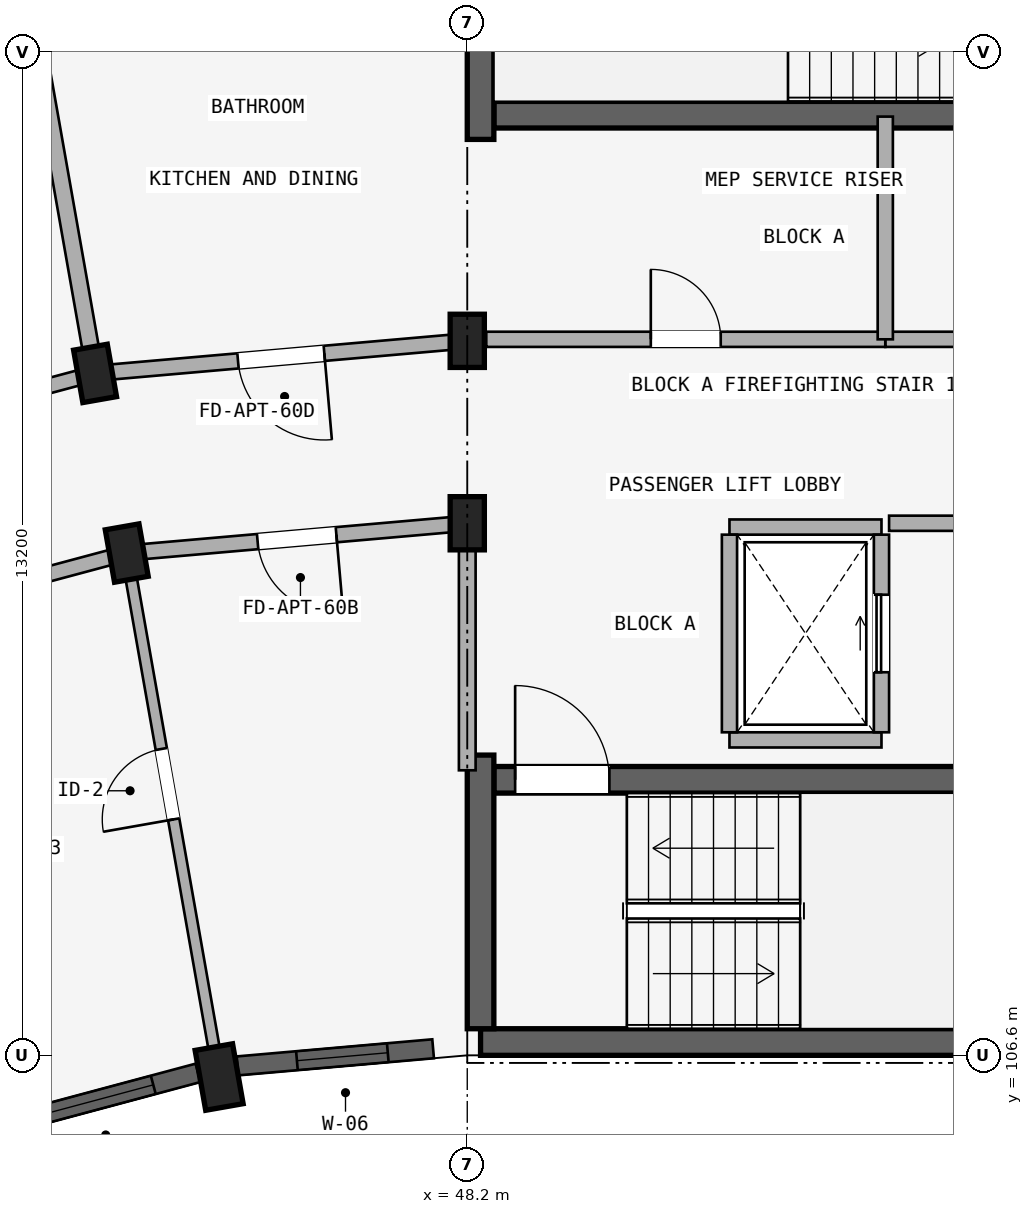
"""IFC4 building model, lengths in metres.
Left out: names, types, materials, properties, quantities, classifications, styles, units other than length and angle.
Written with IfcOpenShell. Run it as: python <this file> out.ifc"""

import sys

from ifc_helpers import new_model, si_unit, direction, frame, frame_2d, origin, origin_2d, place, context, subcontext, project, spatial, rectangle, extrude, element, fill, save


model = new_model("IFC4")
c1 = context("Model", 3, precision=1e-05, world=origin(), true_north=direction((0.0, 1.0)))
c2 = subcontext(c1, "Body", "Model", "MODEL_VIEW")
j1 = project(units=[si_unit("LENGTHUNIT", "METRE"), si_unit("PLANEANGLEUNIT", "RADIAN")], contexts=[c1])
p1 = place(None, origin())
s1 = spatial("IfcSite", under=j1, at=p1, CompositionType="ELEMENT")
p2 = place(p1, origin())
s2 = spatial("IfcBuilding", under=s1, at=p2, CompositionType="ELEMENT")
p3 = place(p2, frame((0.0, 0.0, 18.15)))
s3 = spatial("IfcBuildingStorey", under=s2, at=p3, CompositionType="ELEMENT", Elevation=18.15)
p4 = place(p3, frame((48.55, 118.975, 0.0), z_axis=(0.0, 0.0, 1.0), x_axis=(1.0, 0.0, 0.0)))
e1 = element("IfcWall", 1, at=p4, inside=s3, PredefinedType="SHEAR", context=c2, shape_type="SweptSolid", body=[
    extrude(rectangle(XDim=8.075, YDim=0.35, at=frame_2d((4.038, 0.0))), origin(), (0.0, 0.0, 1.0), 2.93),
])
p5 = place(p4, frame((6.38, 0.0, 0.0)))
e2 = element("IfcOpeningElement", 2, at=p5, cuts=e1, PredefinedType="OPENING", context=c2, shape_type="SweptSolid", body=[
    extrude(rectangle(XDim=1.24, YDim=2.15, at=frame_2d((0.62, 1.075))), frame((0.0, 0.185, 0.0), z_axis=(0.0, -1.0, 0.0), x_axis=(1.0, 0.0, 0.0)), (0.0, 0.0, 1.0), 0.37),
])
p6 = place(p3, frame((48.375, 118.65, 0.0), z_axis=(0.0, 0.0, 1.0), x_axis=(0.0, 1.0, 0.0)))
e3 = element("IfcWall", 3, at=p6, inside=s3, PredefinedType="SHEAR", context=c2, shape_type="SweptSolid", body=[
    extrude(rectangle(XDim=3.6, YDim=0.35, at=frame_2d((1.8, 0.0))), origin(), (0.0, 0.0, 1.0), 2.93),
])
p7 = place(p3, frame((48.375, 106.775, 0.0), z_axis=(0.0, 0.0, 1.0), x_axis=(1.0, 0.0, 0.0)))
e4 = element("IfcWall", 4, at=p7, inside=s3, PredefinedType="SHEAR", context=c2, shape_type="SweptSolid", body=[
    extrude(rectangle(XDim=8.25, YDim=0.35, at=frame_2d((4.125, 0.0))), origin(), (0.0, 0.0, 1.0), 2.93),
])
p8 = place(p3, frame((48.55, 110.225, 0.0), z_axis=(0.0, 0.0, 1.0), x_axis=(1.0, 0.0, 0.0)))
e5 = element("IfcWall", 5, at=p8, inside=s3, PredefinedType="SHEAR", context=c2, shape_type="SweptSolid", body=[
    extrude(rectangle(XDim=7.9, YDim=0.35, at=frame_2d((3.95, 0.0))), origin(), (0.0, 0.0, 1.0), 2.93),
])
p9 = place(p8, frame((0.28, 0.0, 0.0)))
e6 = element("IfcOpeningElement", 6, at=p9, cuts=e5, PredefinedType="OPENING", context=c2, shape_type="SweptSolid", body=[
    extrude(rectangle(XDim=1.24, YDim=2.15, at=frame_2d((0.62, 1.075))), frame((0.0, 0.185, 0.0), z_axis=(0.0, -1.0, 0.0), x_axis=(1.0, 0.0, 0.0)), (0.0, 0.0, 1.0), 0.37),
])
p10 = place(p3, frame((48.375, 106.95, 0.0), z_axis=(0.0, 0.0, 1.0), x_axis=(0.0, 1.0, 0.0)))
e7 = element("IfcWall", 7, at=p10, inside=s3, PredefinedType="SHEAR", context=c2, shape_type="SweptSolid", body=[
    extrude(rectangle(XDim=3.6, YDim=0.35, at=frame_2d((1.8, 0.0))), origin(), (0.0, 0.0, 1.0), 2.93),
])
for number, where, z_axis, x_axis in (
    (8, (48.2, 113.6, 0.0), (0.0, 0.0, 1.0), (1.0, 0.0, 0.0)),
    (9, (48.2, 116.0, 0.0), (0.0, 0.0, 1.0), (1.0, 0.0, 0.0)),
):
    element("IfcColumn", number, at=place(p3, frame(where, z_axis=z_axis, x_axis=x_axis)), inside=s3, PredefinedType="COLUMN", context=c2, shape_type="SweptSolid", body=[
        extrude(rectangle(XDim=0.45, YDim=0.7, at=origin_2d()), origin(), (0.0, 0.0, 1.0), 2.93),
    ])
p11 = place(p3, frame((44.935, 106.314, 0.0), z_axis=(0.0, 0.0, 1.0), x_axis=(0.984807753012, 0.173648177667, 0.0)))
e10 = element("IfcColumn", 10, at=p11, inside=s3, PredefinedType="COLUMN", context=c2, shape_type="SweptSolid", body=[
    extrude(rectangle(XDim=0.5, YDim=0.8, at=origin_2d()), origin(), (0.0, 0.0, 1.0), 2.93),
])
for number, where, z_axis, x_axis in (
    (11, (43.72, 113.208, 0.0), (0.0, 0.0, 1.0), (0.985, 0.174, 0.0)),
    (12, (43.303, 115.572, 0.0), (0.0, 0.0, 1.0), (0.985, 0.174, 0.0)),
):
    element("IfcColumn", number, at=place(p3, frame(where, z_axis=z_axis, x_axis=x_axis)), inside=s3, PredefinedType="COLUMN", context=c2, shape_type="SweptSolid", body=[
        extrude(rectangle(XDim=0.45, YDim=0.7, at=origin_2d()), origin(), (0.0, 0.0, 1.0), 2.93),
    ])
p12 = place(p3, frame((53.7, 116.02, 0.0), z_axis=(0.0, 0.0, 1.0), x_axis=(1.0, 0.0, 0.0)))
e13 = element("IfcWall", 13, at=p12, inside=s3, PredefinedType="STANDARD", context=c2, shape_type="SweptSolid", body=[
    extrude(rectangle(XDim=5.65, YDim=0.2, at=frame_2d((2.825, 0.0))), origin(), (0.0, 0.0, 1.0), 2.372),
])
p13 = place(p12, frame((1.923, 0.0, 0.0)))
e14 = element("IfcOpeningElement", 14, at=p13, cuts=e13, PredefinedType="OPENING", context=c2, shape_type="SweptSolid", body=[
    extrude(rectangle(XDim=1.24, YDim=2.15, at=frame_2d((0.62, 1.075))), frame((0.0, 0.11, 0.0), z_axis=(0.0, -1.0, 0.0), x_axis=(1.0, 0.0, 0.0)), (0.0, 0.0, 1.0), 0.22),
])
p14 = place(p3, frame((48.45, 116.02, 0.0), z_axis=(0.0, 0.0, 1.0), x_axis=(1.0, 0.0, 0.0)))
e15 = element("IfcWall", 15, at=p14, inside=s3, PredefinedType="STANDARD", context=c2, shape_type="SweptSolid", body=[
    extrude(rectangle(XDim=5.25, YDim=0.2, at=frame_2d((2.625, 0.0))), origin(), (0.0, 0.0, 1.0), 2.372),
])
p15 = place(p14, frame((2.165, 0.0, 0.0)))
e16 = element("IfcOpeningElement", 16, at=p15, cuts=e15, PredefinedType="OPENING", context=c2, shape_type="SweptSolid", body=[
    extrude(rectangle(XDim=0.92, YDim=2.1, at=frame_2d((0.46, 1.05))), frame((0.0, 0.11, 0.0), z_axis=(0.0, -1.0, 0.0), x_axis=(1.0, 0.0, 0.0)), (0.0, 0.0, 1.0), 0.22),
])
p16 = place(p3, frame((53.7, 116.02, 0.0), z_axis=(0.0, 0.0, 1.0), x_axis=(0.0, 1.0, 0.0)))
e17 = element("IfcWall", 17, at=p16, inside=s3, PredefinedType="STANDARD", context=c2, shape_type="SweptSolid", body=[
    extrude(rectangle(XDim=2.93, YDim=0.2, at=frame_2d((1.465, 0.0))), origin(), (0.0, 0.0, 1.0), 2.372),
])
p17 = place(p3, frame((51.65, 110.75, 0.0), z_axis=(0.0, 0.0, 1.0), x_axis=(1.0, 0.0, 0.0)))
e18 = element("IfcWall", 18, at=p17, inside=s3, PredefinedType="STANDARD", context=c2, shape_type="SweptSolid", body=[
    extrude(rectangle(XDim=2.0, YDim=0.2, at=frame_2d((1.0, 0.0))), origin(), (0.0, 0.0, 1.0), 2.93),
])
p18 = place(p3, frame((51.65, 113.55, 0.0), z_axis=(0.0, 0.0, 1.0), x_axis=(1.0, 0.0, 0.0)))
e19 = element("IfcWall", 19, at=p18, inside=s3, PredefinedType="STANDARD", context=c2, shape_type="SweptSolid", body=[
    extrude(rectangle(XDim=2.0, YDim=0.2, at=frame_2d((1.0, 0.0))), origin(), (0.0, 0.0, 1.0), 2.372),
])
p19 = place(p3, frame((51.65, 110.85, 0.0), z_axis=(0.0, 0.0, 1.0), x_axis=(0.0, 1.0, 0.0)))
e20 = element("IfcWall", 20, at=p19, inside=s3, PredefinedType="STANDARD", context=c2, shape_type="SweptSolid", body=[
    extrude(rectangle(XDim=2.6, YDim=0.2, at=frame_2d((1.3, 0.0))), origin(), (0.0, 0.0, 1.0), 2.372),
])
p20 = place(p3, frame((53.65, 110.85, 0.0), z_axis=(0.0, 0.0, 1.0), x_axis=(0.0, 1.0, 0.0)))
e21 = element("IfcWall", 21, at=p20, inside=s3, PredefinedType="STANDARD", context=c2, shape_type="SweptSolid", body=[
    extrude(rectangle(XDim=2.6, YDim=0.2, at=frame_2d((1.3, 0.0))), origin(), (0.0, 0.0, 1.0), 2.372),
])
p21 = place(p20, frame((0.79, 0.0, 0.0)))
e22 = element("IfcOpeningElement", 22, at=p21, cuts=e21, PredefinedType="OPENING", context=c2, shape_type="SweptSolid", body=[
    extrude(rectangle(XDim=1.02, YDim=2.15, at=frame_2d((0.51, 1.075))), frame((0.0, 0.11, 0.0), z_axis=(0.0, -1.0, 0.0), x_axis=(1.0, 0.0, 0.0)), (0.0, 0.0, 1.0), 0.22),
])
p22 = place(p3, frame((53.75, 113.6, 0.0), z_axis=(0.0, 0.0, 1.0), x_axis=(1.0, 0.0, 0.0)))
e23 = element("IfcWall", 23, at=p22, inside=s3, PredefinedType="STANDARD", context=c2, shape_type="SweptSolid", body=[
    extrude(rectangle(XDim=5.6, YDim=0.2, at=frame_2d((2.8, 0.0))), origin(), (0.0, 0.0, 1.0), 2.372),
])
p23 = place(p22, frame((1.91, 0.0, 0.0)))
e24 = element("IfcOpeningElement", 24, at=p23, cuts=e23, PredefinedType="OPENING", context=c2, shape_type="SweptSolid", body=[
    extrude(rectangle(XDim=1.22, YDim=2.15, at=frame_2d((0.61, 1.075))), frame((0.0, 0.11, 0.0), z_axis=(0.0, -1.0, 0.0), x_axis=(1.0, 0.0, 0.0)), (0.0, 0.0, 1.0), 0.22),
])
p24 = place(p3, frame((48.2, 113.6, 0.0), z_axis=(0.0, 0.0, 1.0), x_axis=(-0.996191949488, -0.087187153726, 0.0)))
e25 = element("IfcWall", 25, at=p24, inside=s3, PredefinedType="STANDARD", context=c2, shape_type="SweptSolid", body=[
    extrude(rectangle(XDim=4.497, YDim=0.2, at=frame_2d((2.249, 0.0))), origin(), (0.0, 0.0, 1.0), 2.372),
])
p25 = place(p24, frame((1.729, 0.0, 0.0)))
e26 = element("IfcOpeningElement", 26, at=p25, cuts=e25, PredefinedType="OPENING", context=c2, shape_type="SweptSolid", body=[
    extrude(rectangle(XDim=1.04, YDim=2.15, at=frame_2d((0.52, 1.075))), frame((0.0, 0.11, 0.0), z_axis=(0.0, -1.0, 0.0), x_axis=(1.0, 0.0, 0.0)), (0.0, 0.0, 1.0), 0.22),
])
p26 = place(p3, frame((48.2, 116.0, 0.0), z_axis=(0.0, 0.0, 1.0), x_axis=(-0.996193663584, -0.087167566415, 0.0)))
e27 = element("IfcWall", 27, at=p26, inside=s3, PredefinedType="STANDARD", context=c2, shape_type="SweptSolid", body=[
    extrude(rectangle(XDim=4.916, YDim=0.2, at=frame_2d((2.458, 0.0))), origin(), (0.0, 0.0, 1.0), 2.372),
])
p27 = place(p26, frame((1.888, 0.0, 0.0)))
e28 = element("IfcOpeningElement", 28, at=p27, cuts=e27, PredefinedType="OPENING", context=c2, shape_type="SweptSolid", body=[
    extrude(rectangle(XDim=1.14, YDim=2.15, at=frame_2d((0.57, 1.075))), frame((0.0, 0.11, 0.0), z_axis=(0.0, -1.0, 0.0), x_axis=(1.0, 0.0, 0.0)), (0.0, 0.0, 1.0), 0.22),
])
p28 = place(p3, frame((43.72, 113.208, 0.0), z_axis=(0.0, 0.0, 1.0), x_axis=(-0.965934240054, -0.258787642463, 0.0)))
e29 = element("IfcWall", 29, at=p28, inside=s3, PredefinedType="STANDARD", context=c2, shape_type="SweptSolid", body=[
    extrude(rectangle(XDim=4.497, YDim=0.2, at=frame_2d((2.249, 0.0))), origin(), (0.0, 0.0, 1.0), 2.372),
])
p29 = place(p3, frame((43.303, 115.572, 0.0), z_axis=(0.0, 0.0, 1.0), x_axis=(-0.965930095386, -0.258803112091, 0.0)))
e30 = element("IfcWall", 30, at=p29, inside=s3, PredefinedType="STANDARD", context=c2, shape_type="SweptSolid", body=[
    extrude(rectangle(XDim=4.916, YDim=0.2, at=frame_2d((2.458, 0.0))), origin(), (0.0, 0.0, 1.0), 2.372),
])
p30 = place(p29, frame((1.958, 0.0, 0.0)))
e31 = element("IfcOpeningElement", 31, at=p30, cuts=e30, PredefinedType="OPENING", context=c2, shape_type="SweptSolid", body=[
    extrude(rectangle(XDim=1.0, YDim=2.15, at=frame_2d((0.5, 1.075))), frame((0.0, 0.11, 0.0), z_axis=(0.0, -1.0, 0.0), x_axis=(1.0, 0.0, 0.0)), (0.0, 0.0, 1.0), 0.22),
])
p31 = place(p3, frame((48.2, 110.35, 0.0), z_axis=(0.0, 0.0, 1.0), x_axis=(0.0, 1.0, 0.0)))
e32 = element("IfcWall", 32, at=p31, inside=s3, PredefinedType="STANDARD", context=c2, shape_type="SweptSolid", body=[
    extrude(rectangle(XDim=3.2, YDim=0.22, at=frame_2d((1.6, 0.0))), origin(), (0.0, 0.0, 1.0), 2.372),
])
p32 = place(p3, frame((44.901, 106.511, 0.0), z_axis=(0.0, 0.0, 1.0), x_axis=(-0.173647089161, 0.984807944945, 0.0)))
e33 = element("IfcWall", 33, at=p32, inside=s3, PredefinedType="PARTITIONING", context=c2, shape_type="SweptSolid", body=[
    extrude(rectangle(XDim=6.75, YDim=0.15, at=frame_2d((3.375, 0.0))), origin(), (0.0, 0.0, 1.0), 2.372),
])
p33 = place(p32, frame((3.242, 0.0, 0.0)))
e34 = element("IfcOpeningElement", 34, at=p33, cuts=e33, PredefinedType="OPENING", context=c2, shape_type="SweptSolid", body=[
    extrude(rectangle(XDim=0.94, YDim=2.1, at=frame_2d((0.47, 1.05))), frame((0.0, 0.085, 0.0), z_axis=(0.0, -1.0, 0.0), x_axis=(1.0, 0.0, 0.0)), (0.0, 0.0, 1.0), 0.17),
])
p34 = place(p3, frame((43.286, 115.67, 0.0), z_axis=(0.0, 0.0, 1.0), x_axis=(-0.173646216546, 0.984808098809, 0.0)))
e35 = element("IfcWall", 35, at=p34, inside=s3, PredefinedType="STANDARD", context=c2, shape_type="SweptSolid", body=[
    extrude(rectangle(XDim=17.42, YDim=0.22, at=frame_2d((8.71, 0.0))), origin(), (0.0, 0.0, 1.0), 2.372),
])
p35 = place(p3, frame((47.751, 106.686, 0.0), z_axis=(0.0, 0.0, 1.0), x_axis=(-0.996188278786, -0.087229084652, 0.0)))
e36 = element("IfcWall", 36, at=p35, inside=s3, PredefinedType="STANDARD", context=c2, shape_type="SweptSolid", body=[
    extrude(rectangle(XDim=2.583, YDim=0.25, at=frame_2d((1.292, 0.0))), origin(), (0.0, 0.0, 1.0), 2.422),
])
p36 = place(p35, frame((0.599, 0.0, 0.722)))
e37 = element("IfcOpeningElement", 37, at=p36, cuts=e36, PredefinedType="OPENING", context=c2, shape_type="SweptSolid", body=[
    extrude(rectangle(XDim=1.2, YDim=1.5, at=frame_2d((0.6, 0.75))), frame((0.0, 0.135, 0.0), z_axis=(0.0, -1.0, 0.0), x_axis=(1.0, 0.0, 0.0)), (0.0, 0.0, 1.0), 0.27),
])
p37 = place(p3, frame((44.658, 106.369, 0.0), z_axis=(0.0, 0.0, 1.0), x_axis=(-0.965935855992, -0.25878161084, 0.0)))
e38 = element("IfcWall", 38, at=p37, inside=s3, PredefinedType="STANDARD", context=c2, shape_type="SweptSolid", body=[
    extrude(rectangle(XDim=2.77, YDim=0.25, at=frame_2d((1.385, 0.0))), origin(), (0.0, 0.0, 1.0), 2.422),
])
p38 = place(p37, frame((0.61, 0.0, 0.622)))
e39 = element("IfcOpeningElement", 39, at=p38, cuts=e38, PredefinedType="OPENING", context=c2, shape_type="SweptSolid", body=[
    extrude(rectangle(XDim=1.55, YDim=1.6, at=frame_2d((0.775, 0.8))), frame((0.0, 0.135, 0.0), z_axis=(0.0, -1.0, 0.0), x_axis=(1.0, 0.0, 0.0)), (0.0, 0.0, 1.0), 0.27),
])
p39 = place(p36, origin())
e40 = element("IfcWindow", 40, at=p39, inside=s3, PartitioningType="SINGLE_PANEL", PredefinedType="WINDOW", context=c2, shape_type="SweptSolid", body=[
    extrude(rectangle(XDim=1.2, YDim=1.5, at=frame_2d((0.6, 0.75))), frame((0.0, 0.03, 0.0), z_axis=(0.0, -1.0, 0.0), x_axis=(1.0, 0.0, 0.0)), (0.0, 0.0, 1.0), 0.06),
])
fill(e37, e40)
p40 = place(p38, origin())
e41 = element("IfcWindow", 41, at=p40, inside=s3, PartitioningType="DOUBLE_PANEL_VERTICAL", PredefinedType="WINDOW", context=c2, shape_type="SweptSolid", body=[
    extrude(rectangle(XDim=1.55, YDim=1.6, at=frame_2d((0.775, 0.8))), frame((0.0, 0.03, 0.0), z_axis=(0.0, -1.0, 0.0), x_axis=(1.0, 0.0, 0.0)), (0.0, 0.0, 1.0), 0.06),
])
fill(e39, e41)
p41 = place(p15, origin())
e42 = element("IfcDoor", 42, at=p41, inside=s3, OperationType="SINGLE_SWING_LEFT", PredefinedType="DOOR", context=c2, shape_type="SweptSolid", body=[
    extrude(rectangle(XDim=0.92, YDim=2.1, at=frame_2d((0.46, 1.05))), frame((0.0, 0.025, 0.0), z_axis=(0.0, -1.0, 0.0), x_axis=(1.0, 0.0, 0.0)), (0.0, 0.0, 1.0), 0.05),
])
fill(e16, e42)
p42 = place(p9, frame((1.24, 0.0, 0.0), z_axis=(0.0, 0.0, 1.0), x_axis=(-1.0, 0.0, 0.0)))
e43 = element("IfcDoor", 43, at=p42, inside=s3, OperationType="SINGLE_SWING_RIGHT", PredefinedType="DOOR", context=c2, shape_type="SweptSolid", body=[
    extrude(rectangle(XDim=1.24, YDim=2.15, at=frame_2d((0.62, 1.075))), frame((0.0, 0.025, 0.0), z_axis=(0.0, -1.0, 0.0), x_axis=(1.0, 0.0, 0.0)), (0.0, 0.0, 1.0), 0.05),
])
fill(e6, e43)
p43 = place(p21, origin())
e44 = element("IfcDoor", 44, at=p43, inside=s3, OperationType="SLIDING_TO_RIGHT", PredefinedType="DOOR", context=c2, shape_type="SweptSolid", body=[
    extrude(rectangle(XDim=1.02, YDim=2.15, at=frame_2d((0.51, 1.075))), frame((0.0, 0.025, 0.0), z_axis=(0.0, -1.0, 0.0), x_axis=(1.0, 0.0, 0.0)), (0.0, 0.0, 1.0), 0.05),
])
fill(e22, e44)
p44 = place(p33, frame((0.94, 0.0, 0.0), z_axis=(0.0, 0.0, 1.0), x_axis=(-1.0, 0.0, 0.0)))
e45 = element("IfcDoor", 45, at=p44, inside=s3, OperationType="SINGLE_SWING_RIGHT", PredefinedType="DOOR", context=c2, shape_type="SweptSolid", body=[
    extrude(rectangle(XDim=0.94, YDim=2.1, at=frame_2d((0.47, 1.05))), frame((0.0, 0.025, 0.0), z_axis=(0.0, -1.0, 0.0), x_axis=(1.0, 0.0, 0.0)), (0.0, 0.0, 1.0), 0.05),
])
fill(e34, e45)
p45 = place(p27, frame((1.14, 0.0, 0.0), z_axis=(0.0, 0.0, 1.0), x_axis=(-1.0, 0.0, 0.0)))
e46 = element("IfcDoor", 46, at=p45, inside=s3, OperationType="SINGLE_SWING_RIGHT", PredefinedType="DOOR", context=c2, shape_type="SweptSolid", body=[
    extrude(rectangle(XDim=1.14, YDim=2.15, at=frame_2d((0.57, 1.075))), frame((0.0, 0.025, 0.0), z_axis=(0.0, -1.0, 0.0), x_axis=(1.0, 0.0, 0.0)), (0.0, 0.0, 1.0), 0.05),
])
fill(e28, e46)
p46 = place(p25, frame((1.04, 0.0, 0.0), z_axis=(0.0, 0.0, 1.0), x_axis=(-1.0, 0.0, 0.0)))
e47 = element("IfcDoor", 47, at=p46, inside=s3, OperationType="SINGLE_SWING_RIGHT", PredefinedType="DOOR", context=c2, shape_type="SweptSolid", body=[
    extrude(rectangle(XDim=1.04, YDim=2.15, at=frame_2d((0.52, 1.075))), frame((0.0, 0.025, 0.0), z_axis=(0.0, -1.0, 0.0), x_axis=(1.0, 0.0, 0.0)), (0.0, 0.0, 1.0), 0.05),
])
fill(e26, e47)
save(model, sys.argv[1])
